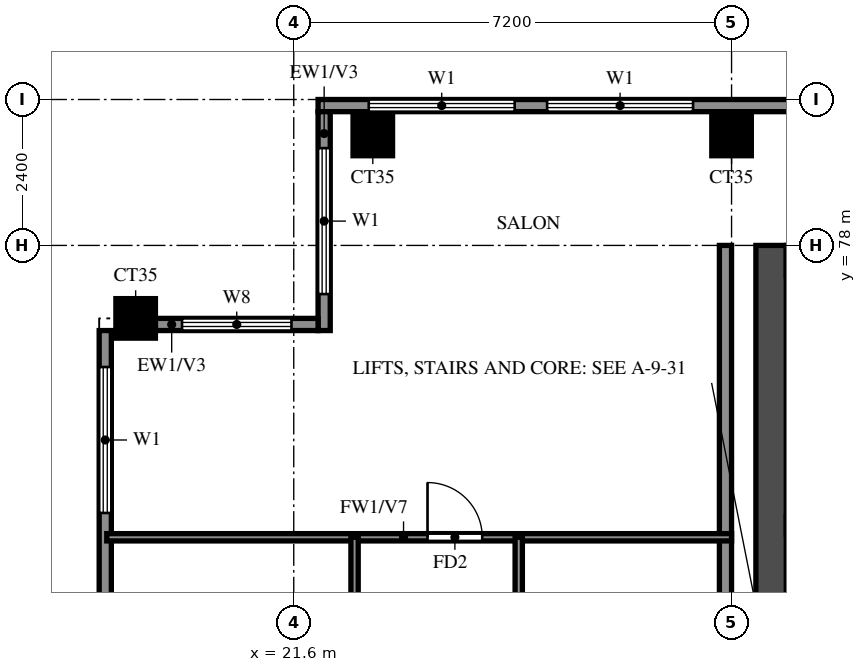
"""IFC4 building model, lengths in metres.
Left out: names, types, materials, properties, quantities, classifications, styles, units other than length and angle.
Written with IfcOpenShell. Run it as: python <this file> out.ifc"""

import sys

from ifc_helpers import new_model, si_unit, direction, frame, frame_2d, origin, origin_2d, place, context, subcontext, project, spatial, rectangle, extrude, source, transform, mapped, element, fill, save


model = new_model("IFC4")
c1 = context("Model", 3, precision=1e-05, world=origin(), true_north=direction((0.0, 1.0)))
c2 = subcontext(c1, "Body", "Model", "MODEL_VIEW")
j1 = project(units=[si_unit("LENGTHUNIT", "METRE"), si_unit("PLANEANGLEUNIT", "RADIAN")], contexts=[c1])
p1 = place(None, origin())
s1 = spatial("IfcSite", under=j1, at=p1, CompositionType="ELEMENT")
p2 = place(p1, origin())
s2 = spatial("IfcBuilding", under=s1, at=p2, CompositionType="ELEMENT")
p3 = place(p2, frame((0.0, 0.0, 250.0)))
s3 = spatial("IfcBuildingStorey", under=s2, at=p3, CompositionType="ELEMENT", Elevation=250.0)
m1 = source(origin(), c2, "Body", "SweptSolid", [
    extrude(rectangle(XDim=0.65, YDim=0.65, at=origin_2d()), origin(), (0.0, 0.0, 1.0), 3.22),
])
for number, where, z_axis, x_axis in (
    (1, (19.0, 76.8, 0.0), (0.0, 0.0, 1.0), (1.0, 0.0, 0.0)),
    (2, (22.9, 79.8, 0.0), (0.0, 0.0, 1.0), (1.0, 0.0, 0.0)),
    (3, (28.8, 79.8, 0.0), (0.0, 0.0, 1.0), (1.0, 0.0, 0.0)),
):
    element("IfcColumn", number, at=place(p3, frame(where, z_axis=z_axis, x_axis=x_axis)), inside=s3, PredefinedType="COLUMN", context=c2, shape_type="MappedRepresentation", body=[
        mapped(m1, transform((0.0, 0.0, 0.0))),
    ])
p4 = place(p3, frame((29.45, 66.15, 0.0), z_axis=(0.0, 0.0, 1.0), x_axis=(0.0, 1.0, 0.0)))
e4 = element("IfcWall", 4, at=p4, inside=s3, PredefinedType="SHEAR", context=c2, shape_type="SweptSolid", body=[
    extrude(rectangle(XDim=11.85, YDim=0.5, at=frame_2d((5.925, 0.0))), origin(), (0.0, 0.0, 1.0), 3.22),
])
p5 = place(p3, frame((78.6, 80.3, 0.0), z_axis=(0.0, 0.0, 1.0), x_axis=(-1.0, 0.0, 0.0)))
e5 = element("IfcWall", 5, at=p5, inside=s3, PredefinedType="SOLIDWALL", context=c2, shape_type="SweptSolid", body=[
    extrude(rectangle(XDim=56.6, YDim=0.2, at=frame_2d((28.3, 0.0))), origin(), (0.0, 0.0, 1.0), 3.22),
])
p6 = place(p5, frame((50.433, 0.0, 0.6)))
e6 = element("IfcOpeningElement", 6, at=p6, cuts=e5, PredefinedType="OPENING", context=c2, shape_type="SweptSolid", body=[
    extrude(rectangle(XDim=2.4, YDim=2.4, at=frame_2d((1.2, 1.2))), frame((0.0, 0.11, 0.0), z_axis=(0.0, -1.0, 0.0), x_axis=(1.0, 0.0, 0.0)), (0.0, 0.0, 1.0), 0.22),
])
p7 = place(p5, frame((53.367, 0.0, 0.6)))
e7 = element("IfcOpeningElement", 7, at=p7, cuts=e5, PredefinedType="OPENING", context=c2, shape_type="SweptSolid", body=[
    extrude(rectangle(XDim=2.4, YDim=2.4, at=frame_2d((1.2, 1.2))), frame((0.0, 0.11, 0.0), z_axis=(0.0, -1.0, 0.0), x_axis=(1.0, 0.0, 0.0)), (0.0, 0.0, 1.0), 0.22),
])
p8 = place(p5, frame((0.767, 0.0, 0.6)))
e8 = element("IfcOpeningElement", 8, at=p8, cuts=e5, PredefinedType="OPENING", context=c2, shape_type="SweptSolid", body=[
    extrude(rectangle(XDim=2.4, YDim=2.4, at=frame_2d((1.2, 1.2))), frame((0.0, 0.11, 0.0), z_axis=(0.0, -1.0, 0.0), x_axis=(1.0, 0.0, 0.0)), (0.0, 0.0, 1.0), 0.22),
])
p9 = place(p5, frame((3.633, 0.0, 0.6)))
e9 = element("IfcOpeningElement", 9, at=p9, cuts=e5, PredefinedType="OPENING", context=c2, shape_type="SweptSolid", body=[
    extrude(rectangle(XDim=2.4, YDim=2.4, at=frame_2d((1.2, 1.2))), frame((0.0, 0.11, 0.0), z_axis=(0.0, -1.0, 0.0), x_axis=(1.0, 0.0, 0.0)), (0.0, 0.0, 1.0), 0.22),
])
p10 = place(p3, frame((22.1, 80.2, 0.0), z_axis=(0.0, 0.0, 1.0), x_axis=(0.0, -1.0, 0.0)))
e10 = element("IfcWall", 10, at=p10, inside=s3, PredefinedType="SOLIDWALL", context=c2, shape_type="SweptSolid", body=[
    extrude(rectangle(XDim=3.6, YDim=0.2, at=frame_2d((1.8, 0.0))), origin(), (0.0, 0.0, 1.0), 3.22),
])
p11 = place(p10, frame((0.6, 0.0, 0.6)))
e11 = element("IfcOpeningElement", 11, at=p11, cuts=e10, PredefinedType="OPENING", context=c2, shape_type="SweptSolid", body=[
    extrude(rectangle(XDim=2.4, YDim=2.4, at=frame_2d((1.2, 1.2))), frame((0.0, 0.11, 0.0), z_axis=(0.0, -1.0, 0.0), x_axis=(1.0, 0.0, 0.0)), (0.0, 0.0, 1.0), 0.22),
])
p12 = place(p3, frame((22.0, 76.7, 0.0), z_axis=(0.0, 0.0, 1.0), x_axis=(-1.0, 0.0, 0.0)))
e12 = element("IfcWall", 12, at=p12, inside=s3, PredefinedType="SOLIDWALL", context=c2, shape_type="SweptSolid", body=[
    extrude(rectangle(XDim=2.675, YDim=0.2, at=frame_2d((1.337, 0.0))), origin(), (0.0, 0.0, 1.0), 3.22),
])
p13 = place(p12, frame((0.438, 0.0, 0.6)))
e13 = element("IfcOpeningElement", 13, at=p13, cuts=e12, PredefinedType="OPENING", context=c2, shape_type="SweptSolid", body=[
    extrude(rectangle(XDim=1.8, YDim=2.4, at=frame_2d((0.9, 1.2))), frame((0.0, 0.11, 0.0), z_axis=(0.0, -1.0, 0.0), x_axis=(1.0, 0.0, 0.0)), (0.0, 0.0, 1.0), 0.22),
])
p14 = place(p3, frame((18.5, 76.6, 0.0), z_axis=(0.0, 0.0, 1.0), x_axis=(0.0, -1.0, 0.0)))
e14 = element("IfcWall", 14, at=p14, inside=s3, PredefinedType="SOLIDWALL", context=c2, shape_type="SweptSolid", body=[
    extrude(rectangle(XDim=33.4, YDim=0.2, at=frame_2d((16.7, 0.0))), origin(), (0.0, 0.0, 1.0), 3.22),
])
p15 = place(p14, frame((11.5, 0.0, 0.0)))
e15 = element("IfcOpeningElement", 15, at=p15, cuts=e14, PredefinedType="OPENING", context=c2, shape_type="SweptSolid", body=[
    extrude(rectangle(XDim=1.8, YDim=2.4, at=frame_2d((0.9, 1.2))), frame((0.0, 0.11, 0.0), z_axis=(0.0, -1.0, 0.0), x_axis=(1.0, 0.0, 0.0)), (0.0, 0.0, 1.0), 0.22),
])
p16 = place(p14, frame((25.9, 0.0, 0.0)))
e16 = element("IfcOpeningElement", 16, at=p16, cuts=e14, PredefinedType="OPENING", context=c2, shape_type="SweptSolid", body=[
    extrude(rectangle(XDim=1.8, YDim=2.4, at=frame_2d((0.9, 1.2))), frame((0.0, 0.11, 0.0), z_axis=(0.0, -1.0, 0.0), x_axis=(1.0, 0.0, 0.0)), (0.0, 0.0, 1.0), 0.22),
])
p17 = place(p14, frame((28.9, 0.0, 0.6)))
e17 = element("IfcOpeningElement", 17, at=p17, cuts=e14, PredefinedType="OPENING", context=c2, shape_type="SweptSolid", body=[
    extrude(rectangle(XDim=1.2, YDim=2.4, at=frame_2d((0.6, 1.2))), frame((0.0, 0.11, 0.0), z_axis=(0.0, -1.0, 0.0), x_axis=(1.0, 0.0, 0.0)), (0.0, 0.0, 1.0), 0.22),
])
p18 = place(p14, frame((31.2, 0.0, 0.6)))
e18 = element("IfcOpeningElement", 18, at=p18, cuts=e14, PredefinedType="OPENING", context=c2, shape_type="SweptSolid", body=[
    extrude(rectangle(XDim=1.8, YDim=2.4, at=frame_2d((0.9, 1.2))), frame((0.0, 0.11, 0.0), z_axis=(0.0, -1.0, 0.0), x_axis=(1.0, 0.0, 0.0)), (0.0, 0.0, 1.0), 0.22),
])
p19 = place(p14, frame((18.233, 0.0, 0.6)))
e19 = element("IfcOpeningElement", 19, at=p19, cuts=e14, PredefinedType="OPENING", context=c2, shape_type="SweptSolid", body=[
    extrude(rectangle(XDim=2.4, YDim=2.4, at=frame_2d((1.2, 1.2))), frame((0.0, 0.11, 0.0), z_axis=(0.0, -1.0, 0.0), x_axis=(1.0, 0.0, 0.0)), (0.0, 0.0, 1.0), 0.22),
])
p20 = place(p14, frame((20.967, 0.0, 0.6)))
e20 = element("IfcOpeningElement", 20, at=p20, cuts=e14, PredefinedType="OPENING", context=c2, shape_type="SweptSolid", body=[
    extrude(rectangle(XDim=2.4, YDim=2.4, at=frame_2d((1.2, 1.2))), frame((0.0, 0.11, 0.0), z_axis=(0.0, -1.0, 0.0), x_axis=(1.0, 0.0, 0.0)), (0.0, 0.0, 1.0), 0.22),
])
p21 = place(p14, frame((14.5, 0.0, 0.6)))
e21 = element("IfcOpeningElement", 21, at=p21, cuts=e14, PredefinedType="OPENING", context=c2, shape_type="SweptSolid", body=[
    extrude(rectangle(XDim=1.2, YDim=2.4, at=frame_2d((0.6, 1.2))), frame((0.0, 0.11, 0.0), z_axis=(0.0, -1.0, 0.0), x_axis=(1.0, 0.0, 0.0)), (0.0, 0.0, 1.0), 0.22),
])
p22 = place(p14, frame((16.75, 0.0, 0.6)))
e22 = element("IfcOpeningElement", 22, at=p22, cuts=e14, PredefinedType="OPENING", context=c2, shape_type="SweptSolid", body=[
    extrude(rectangle(XDim=0.9, YDim=2.4, at=frame_2d((0.45, 1.2))), frame((0.0, 0.11, 0.0), z_axis=(0.0, -1.0, 0.0), x_axis=(1.0, 0.0, 0.0)), (0.0, 0.0, 1.0), 0.22),
])
p23 = place(p14, frame((7.3, 0.0, 0.6)))
e23 = element("IfcOpeningElement", 23, at=p23, cuts=e14, PredefinedType="OPENING", context=c2, shape_type="SweptSolid", body=[
    extrude(rectangle(XDim=1.8, YDim=2.4, at=frame_2d((0.9, 1.2))), frame((0.0, 0.11, 0.0), z_axis=(0.0, -1.0, 0.0), x_axis=(1.0, 0.0, 0.0)), (0.0, 0.0, 1.0), 0.22),
])
p24 = place(p14, frame((4.75, 0.0, 1.5)))
e24 = element("IfcOpeningElement", 24, at=p24, cuts=e14, PredefinedType="OPENING", context=c2, shape_type="SweptSolid", body=[
    extrude(rectangle(XDim=0.9, YDim=0.9, at=frame_2d((0.45, 0.45))), frame((0.0, 0.11, 0.0), z_axis=(0.0, -1.0, 0.0), x_axis=(1.0, 0.0, 0.0)), (0.0, 0.0, 1.0), 0.22),
])
p25 = place(p14, frame((0.6, 0.0, 0.6)))
e25 = element("IfcOpeningElement", 25, at=p25, cuts=e14, PredefinedType="OPENING", context=c2, shape_type="SweptSolid", body=[
    extrude(rectangle(XDim=2.4, YDim=2.4, at=frame_2d((1.2, 1.2))), frame((0.0, 0.11, 0.0), z_axis=(0.0, -1.0, 0.0), x_axis=(1.0, 0.0, 0.0)), (0.0, 0.0, 1.0), 0.22),
])
p26 = place(p3, frame((28.7, 62.4, 0.0), z_axis=(0.0, 0.0, 1.0), x_axis=(0.0, 1.0, 0.0)))
e26 = element("IfcWall", 26, at=p26, inside=s3, PredefinedType="SOLIDWALL", context=c2, shape_type="SweptSolid", body=[
    extrude(rectangle(XDim=15.6, YDim=0.2, at=frame_2d((7.8, 0.0))), origin(), (0.0, 0.0, 1.0), 3.22),
])
p27 = place(p3, frame((18.525, 73.2, 0.0), z_axis=(0.0, 0.0, 1.0), x_axis=(1.0, 0.0, 0.0)))
e27 = element("IfcWall", 27, at=p27, inside=s3, PredefinedType="PARTITIONING", context=c2, shape_type="SweptSolid", body=[
    extrude(rectangle(XDim=10.275, YDim=0.12, at=frame_2d((5.138, 0.0))), origin(), (0.0, 0.0, 1.0), 2.32),
])
p28 = place(p27, frame((5.275, 0.0, 0.0)))
e28 = element("IfcOpeningElement", 28, at=p28, cuts=e27, PredefinedType="OPENING", context=c2, shape_type="SweptSolid", body=[
    extrude(rectangle(XDim=0.9, YDim=2.1, at=frame_2d((0.45, 1.05))), frame((0.0, 0.07, 0.0), z_axis=(0.0, -1.0, 0.0), x_axis=(1.0, 0.0, 0.0)), (0.0, 0.0, 1.0), 0.14),
])
p29 = place(p3, frame((22.6, 69.6, 0.0), z_axis=(0.0, 0.0, 1.0), x_axis=(0.0, 1.0, 0.0)))
e29 = element("IfcWall", 29, at=p29, inside=s3, PredefinedType="PARTITIONING", context=c2, shape_type="SweptSolid", body=[
    extrude(rectangle(XDim=3.6, YDim=0.12, at=frame_2d((1.8, 0.0))), origin(), (0.0, 0.0, 1.0), 3.22),
])
p30 = place(p3, frame((25.3, 64.8, 0.0), z_axis=(0.0, 0.0, 1.0), x_axis=(0.0, 1.0, 0.0)))
e30 = element("IfcWall", 30, at=p30, inside=s3, PredefinedType="PARTITIONING", context=c2, shape_type="SweptSolid", body=[
    extrude(rectangle(XDim=8.4, YDim=0.12, at=frame_2d((4.2, 0.0))), origin(), (0.0, 0.0, 1.0), 3.22),
])
p31 = place(p30, frame((4.925, 0.0, 0.0)))
e31 = element("IfcOpeningElement", 31, at=p31, cuts=e30, PredefinedType="OPENING", context=c2, shape_type="SweptSolid", body=[
    extrude(rectangle(XDim=0.9, YDim=2.1, at=frame_2d((0.45, 1.05))), frame((0.0, 0.07, 0.0), z_axis=(0.0, -1.0, 0.0), x_axis=(1.0, 0.0, 0.0)), (0.0, 0.0, 1.0), 0.14),
])
p32 = place(p6, origin())
e32 = element("IfcWindow", 32, at=p32, inside=s3, PartitioningType="DOUBLE_PANEL_VERTICAL", PredefinedType="WINDOW", context=c2, shape_type="SweptSolid", body=[
    extrude(rectangle(XDim=2.4, YDim=2.4, at=frame_2d((1.2, 1.2))), frame((0.0, 0.03, 0.0), z_axis=(0.0, -1.0, 0.0), x_axis=(1.0, 0.0, 0.0)), (0.0, 0.0, 1.0), 0.06),
])
fill(e6, e32)
p33 = place(p7, origin())
e33 = element("IfcWindow", 33, at=p33, inside=s3, PartitioningType="DOUBLE_PANEL_VERTICAL", PredefinedType="WINDOW", context=c2, shape_type="SweptSolid", body=[
    extrude(rectangle(XDim=2.4, YDim=2.4, at=frame_2d((1.2, 1.2))), frame((0.0, 0.03, 0.0), z_axis=(0.0, -1.0, 0.0), x_axis=(1.0, 0.0, 0.0)), (0.0, 0.0, 1.0), 0.06),
])
fill(e7, e33)
p34 = place(p11, origin())
e34 = element("IfcWindow", 34, at=p34, inside=s3, PartitioningType="DOUBLE_PANEL_VERTICAL", PredefinedType="WINDOW", context=c2, shape_type="SweptSolid", body=[
    extrude(rectangle(XDim=2.4, YDim=2.4, at=frame_2d((1.2, 1.2))), frame((0.0, 0.03, 0.0), z_axis=(0.0, -1.0, 0.0), x_axis=(1.0, 0.0, 0.0)), (0.0, 0.0, 1.0), 0.06),
])
fill(e11, e34)
p35 = place(p13, origin())
e35 = element("IfcWindow", 35, at=p35, inside=s3, PartitioningType="DOUBLE_PANEL_VERTICAL", PredefinedType="WINDOW", context=c2, shape_type="SweptSolid", body=[
    extrude(rectangle(XDim=1.8, YDim=2.4, at=frame_2d((0.9, 1.2))), frame((0.0, 0.03, 0.0), z_axis=(0.0, -1.0, 0.0), x_axis=(1.0, 0.0, 0.0)), (0.0, 0.0, 1.0), 0.06),
])
fill(e13, e35)
p36 = place(p25, origin())
e36 = element("IfcWindow", 36, at=p36, inside=s3, PartitioningType="DOUBLE_PANEL_VERTICAL", PredefinedType="WINDOW", context=c2, shape_type="SweptSolid", body=[
    extrude(rectangle(XDim=2.4, YDim=2.4, at=frame_2d((1.2, 1.2))), frame((0.0, 0.03, 0.0), z_axis=(0.0, -1.0, 0.0), x_axis=(1.0, 0.0, 0.0)), (0.0, 0.0, 1.0), 0.06),
])
fill(e25, e36)
p37 = place(p28, origin())
e37 = element("IfcDoor", 37, at=p37, inside=s3, OperationType="SINGLE_SWING_LEFT", PredefinedType="DOOR", context=c2, shape_type="SweptSolid", body=[
    extrude(rectangle(XDim=0.9, YDim=2.1, at=frame_2d((0.45, 1.05))), frame((0.0, 0.025, 0.0), z_axis=(0.0, -1.0, 0.0), x_axis=(1.0, 0.0, 0.0)), (0.0, 0.0, 1.0), 0.05),
])
fill(e28, e37)
save(model, sys.argv[1])
